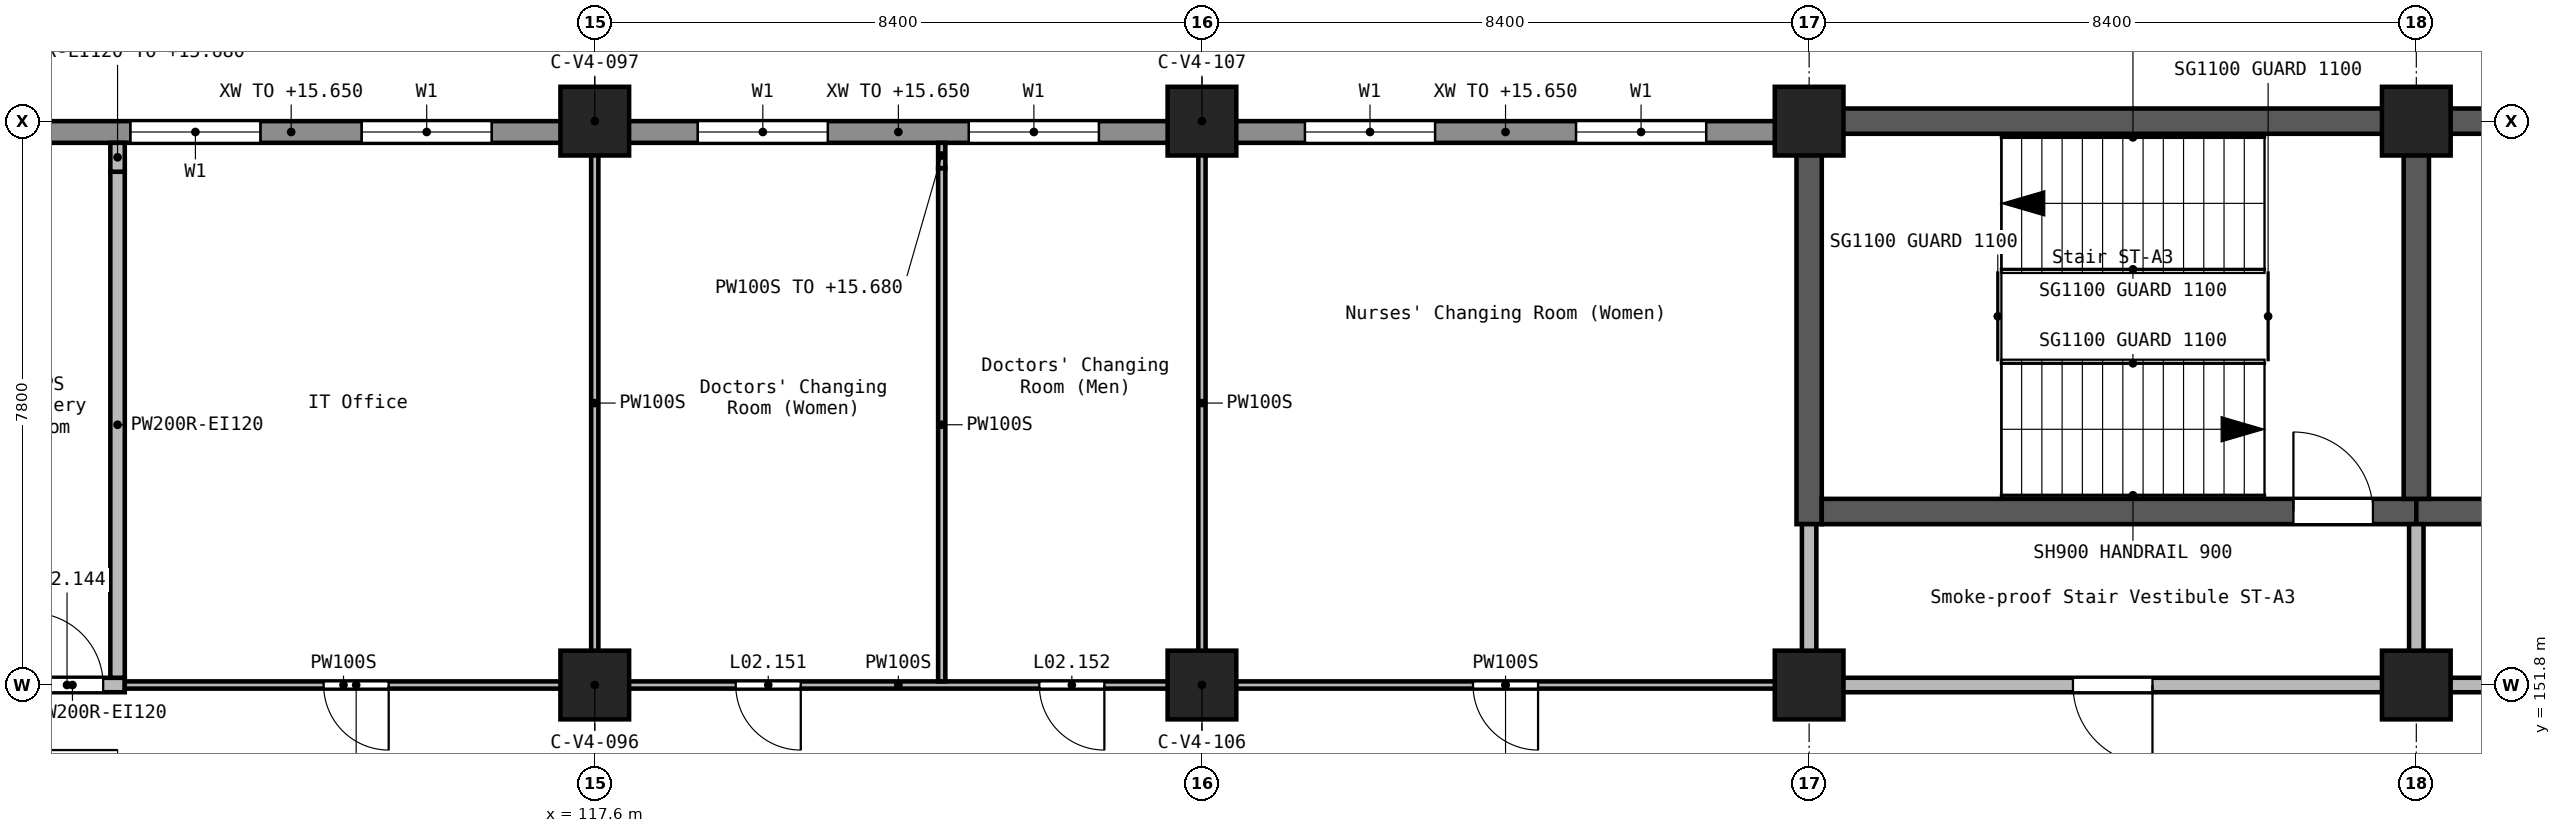
"""IFC4 building model, lengths in metres.
Left out: names, types, materials, properties, quantities, classifications, styles, units other than length and angle.
Written with IfcOpenShell. Run it as: python <this file> out.ifc"""

import sys

from ifc_helpers import new_model, si_unit, direction, frame, frame_2d, origin, origin_2d, place, context, subcontext, project, spatial, rectangle, extrude, element, fill, save


model = new_model("IFC4")
c1 = context("Model", 3, precision=1e-05, world=origin(), true_north=direction((0.0, 1.0)))
c2 = subcontext(c1, "Body", "Model", "MODEL_VIEW")
j1 = project(units=[si_unit("LENGTHUNIT", "METRE"), si_unit("PLANEANGLEUNIT", "RADIAN")], contexts=[c1])
p1 = place(None, origin())
s1 = spatial("IfcSite", under=j1, at=p1, CompositionType="ELEMENT")
p2 = place(p1, origin())
s2 = spatial("IfcBuilding", under=s1, at=p2, CompositionType="ELEMENT")
p3 = place(p2, frame((0.0, 0.0, 12.6)))
s3 = spatial("IfcBuildingStorey", under=s2, at=p3, CompositionType="ELEMENT", Elevation=12.6)
for number, where, z_axis, x_axis in (
    (1, (117.6, 151.8, 0.0), (0.0, 0.0, 1.0), (1.0, 0.0, 0.0)),
    (2, (117.6, 159.6, 0.0), (0.0, 0.0, 1.0), (1.0, 0.0, 0.0)),
    (3, (126.0, 151.8, 0.0), (0.0, 0.0, 1.0), (1.0, 0.0, 0.0)),
    (4, (126.0, 159.6, 0.0), (0.0, 0.0, 1.0), (1.0, 0.0, 0.0)),
    (5, (134.4, 151.8, 0.0), (0.0, 0.0, 1.0), (1.0, 0.0, 0.0)),
    (6, (134.4, 159.6, 0.0), (0.0, 0.0, 1.0), (1.0, 0.0, 0.0)),
    (7, (142.8, 151.8, 0.0), (0.0, 0.0, 1.0), (1.0, 0.0, 0.0)),
    (8, (142.8, 159.6, 0.0), (0.0, 0.0, 1.0), (1.0, 0.0, 0.0)),
):
    element("IfcColumn", number, at=place(p3, frame(where, z_axis=z_axis, x_axis=x_axis)), inside=s3, PredefinedType="COLUMN", context=c2, shape_type="SweptSolid", body=[
        extrude(rectangle(XDim=0.95, YDim=0.95, at=origin_2d()), origin(), (0.0, 0.0, 1.0), 4.2),
    ])
p4 = place(p3, frame((134.225, 159.6, 0.0), z_axis=(0.0, 0.0, 1.0), x_axis=(1.0, 0.0, 0.0)))
e9 = element("IfcWall", 9, at=p4, inside=s3, PredefinedType="SHEAR", context=c2, shape_type="SweptSolid", body=[
    extrude(rectangle(XDim=8.575, YDim=0.35, at=frame_2d((4.288, 0.0))), origin(), (0.0, 0.0, 1.0), 4.2),
])
p5 = place(p3, frame((134.4, 154.025, 0.0), z_axis=(0.0, 0.0, 1.0), x_axis=(0.0, 1.0, 0.0)))
e10 = element("IfcWall", 10, at=p5, inside=s3, PredefinedType="SHEAR", context=c2, shape_type="SweptSolid", body=[
    extrude(rectangle(XDim=5.4, YDim=0.35, at=frame_2d((2.7, 0.0))), origin(), (0.0, 0.0, 1.0), 4.2),
])
p6 = place(p3, frame((134.575, 154.2, 0.0), z_axis=(0.0, 0.0, 1.0), x_axis=(1.0, 0.0, 0.0)))
e11 = element("IfcWall", 11, at=p6, inside=s3, PredefinedType="SHEAR", context=c2, shape_type="SweptSolid", body=[
    extrude(rectangle(XDim=8.225, YDim=0.35, at=frame_2d((4.113, 0.0))), origin(), (0.0, 0.0, 1.0), 4.2),
])
p7 = place(p6, frame((6.525, 0.0, 0.0)))
e12 = element("IfcOpeningElement", 12, at=p7, cuts=e11, PredefinedType="OPENING", context=c2, shape_type="SweptSolid", body=[
    extrude(rectangle(XDim=1.1, YDim=2.1, at=frame_2d((0.55, 1.05))), frame((0.0, 0.185, 0.0), z_axis=(0.0, -1.0, 0.0), x_axis=(1.0, 0.0, 0.0)), (0.0, 0.0, 1.0), 0.37),
])
p8 = place(p3, frame((142.8, 154.2, 0.0), z_axis=(0.0, 0.0, 1.0), x_axis=(1.0, 0.0, 0.0)))
e13 = element("IfcWall", 13, at=p8, inside=s3, PredefinedType="SHEAR", context=c2, shape_type="SweptSolid", body=[
    extrude(rectangle(XDim=8.4, YDim=0.35, at=frame_2d((4.2, 0.0))), origin(), (0.0, 0.0, 1.0), 4.2),
])
p9 = place(p8, frame((6.7, 0.0, 0.0)))
e14 = element("IfcOpeningElement", 14, at=p9, cuts=e13, PredefinedType="OPENING", context=c2, shape_type="SweptSolid", body=[
    extrude(rectangle(XDim=1.1, YDim=2.1, at=frame_2d((0.55, 1.05))), frame((0.0, 0.185, 0.0), z_axis=(0.0, -1.0, 0.0), x_axis=(1.0, 0.0, 0.0)), (0.0, 0.0, 1.0), 0.37),
])
p10 = place(p3, frame((142.8, 154.375, 0.0), z_axis=(0.0, 0.0, 1.0), x_axis=(0.0, 1.0, 0.0)))
e15 = element("IfcWall", 15, at=p10, inside=s3, PredefinedType="SHEAR", context=c2, shape_type="SweptSolid", body=[
    extrude(rectangle(XDim=5.05, YDim=0.35, at=frame_2d((2.525, 0.0))), origin(), (0.0, 0.0, 1.0), 4.2),
])
p11 = place(p3, frame((142.8, 159.6, 0.0), z_axis=(0.0, 0.0, 1.0), x_axis=(1.0, 0.0, 0.0)))
e16 = element("IfcWall", 16, at=p11, inside=s3, PredefinedType="SHEAR", context=c2, shape_type="SweptSolid", body=[
    extrude(rectangle(XDim=8.4, YDim=0.35, at=frame_2d((4.2, 0.0))), origin(), (0.0, 0.0, 1.0), 4.2),
])
p12 = place(p3, frame((133.95, 159.45, 0.0), z_axis=(0.0, 0.0, 1.0), x_axis=(-1.0, 0.0, 0.0)))
e17 = element("IfcWall", 17, at=p12, inside=s3, PredefinedType="STANDARD", context=c2, shape_type="SweptSolid", body=[
    extrude(rectangle(XDim=7.5, YDim=0.3, at=frame_2d((3.75, 0.0))), origin(), (0.0, 0.0, 1.0), 3.05),
])
p13 = place(p12, frame((0.975, 0.0, 0.9)))
e18 = element("IfcOpeningElement", 18, at=p13, cuts=e17, PredefinedType="OPENING", context=c2, shape_type="SweptSolid", body=[
    extrude(rectangle(XDim=1.8, YDim=1.5, at=frame_2d((0.9, 0.75))), frame((0.0, 0.16, 0.0), z_axis=(0.0, -1.0, 0.0), x_axis=(1.0, 0.0, 0.0)), (0.0, 0.0, 1.0), 0.32),
])
p14 = place(p12, frame((4.725, 0.0, 0.9)))
e19 = element("IfcOpeningElement", 19, at=p14, cuts=e17, PredefinedType="OPENING", context=c2, shape_type="SweptSolid", body=[
    extrude(rectangle(XDim=1.8, YDim=1.5, at=frame_2d((0.9, 0.75))), frame((0.0, 0.16, 0.0), z_axis=(0.0, -1.0, 0.0), x_axis=(1.0, 0.0, 0.0)), (0.0, 0.0, 1.0), 0.32),
])
p15 = place(p3, frame((125.55, 159.45, 0.0), z_axis=(0.0, 0.0, 1.0), x_axis=(-1.0, 0.0, 0.0)))
e20 = element("IfcWall", 20, at=p15, inside=s3, PredefinedType="STANDARD", context=c2, shape_type="SweptSolid", body=[
    extrude(rectangle(XDim=7.5, YDim=0.3, at=frame_2d((3.75, 0.0))), origin(), (0.0, 0.0, 1.0), 3.05),
])
p16 = place(p15, frame((0.975, 0.0, 0.9)))
e21 = element("IfcOpeningElement", 21, at=p16, cuts=e20, PredefinedType="OPENING", context=c2, shape_type="SweptSolid", body=[
    extrude(rectangle(XDim=1.8, YDim=1.5, at=frame_2d((0.9, 0.75))), frame((0.0, 0.16, 0.0), z_axis=(0.0, -1.0, 0.0), x_axis=(1.0, 0.0, 0.0)), (0.0, 0.0, 1.0), 0.32),
])
p17 = place(p15, frame((4.725, 0.0, 0.9)))
e22 = element("IfcOpeningElement", 22, at=p17, cuts=e20, PredefinedType="OPENING", context=c2, shape_type="SweptSolid", body=[
    extrude(rectangle(XDim=1.8, YDim=1.5, at=frame_2d((0.9, 0.75))), frame((0.0, 0.16, 0.0), z_axis=(0.0, -1.0, 0.0), x_axis=(1.0, 0.0, 0.0)), (0.0, 0.0, 1.0), 0.32),
])
p18 = place(p3, frame((117.15, 159.45, 0.0), z_axis=(0.0, 0.0, 1.0), x_axis=(-1.0, 0.0, 0.0)))
e23 = element("IfcWall", 23, at=p18, inside=s3, PredefinedType="STANDARD", context=c2, shape_type="SweptSolid", body=[
    extrude(rectangle(XDim=7.5, YDim=0.3, at=frame_2d((3.75, 0.0))), origin(), (0.0, 0.0, 1.0), 3.05),
])
p19 = place(p18, frame((0.975, 0.0, 0.9)))
e24 = element("IfcOpeningElement", 24, at=p19, cuts=e23, PredefinedType="OPENING", context=c2, shape_type="SweptSolid", body=[
    extrude(rectangle(XDim=1.8, YDim=1.5, at=frame_2d((0.9, 0.75))), frame((0.0, 0.16, 0.0), z_axis=(0.0, -1.0, 0.0), x_axis=(1.0, 0.0, 0.0)), (0.0, 0.0, 1.0), 0.32),
])
p20 = place(p18, frame((4.175, 0.0, 0.9)))
e25 = element("IfcOpeningElement", 25, at=p20, cuts=e23, PredefinedType="OPENING", context=c2, shape_type="SweptSolid", body=[
    extrude(rectangle(XDim=1.8, YDim=1.5, at=frame_2d((0.9, 0.75))), frame((0.0, 0.16, 0.0), z_axis=(0.0, -1.0, 0.0), x_axis=(1.0, 0.0, 0.0)), (0.0, 0.0, 1.0), 0.32),
])
p21 = place(p3, frame((150.75, 151.8, 0.0), z_axis=(0.0, 0.0, 1.0), x_axis=(-1.0, 0.0, 0.0)))
e26 = element("IfcWall", 26, at=p21, inside=s3, PredefinedType="SOLIDWALL", context=c2, shape_type="SweptSolid", body=[
    extrude(rectangle(XDim=7.5, YDim=0.2, at=frame_2d((3.75, 0.0))), origin(), (0.0, 0.0, 1.0), 3.85),
])
p22 = place(p21, frame((3.2, 0.0, 0.0)))
e27 = element("IfcOpeningElement", 27, at=p22, cuts=e26, PredefinedType="OPENING", context=c2, shape_type="SweptSolid", body=[
    extrude(rectangle(XDim=1.1, YDim=2.1, at=frame_2d((0.55, 1.05))), frame((0.0, 0.11, 0.0), z_axis=(0.0, -1.0, 0.0), x_axis=(1.0, 0.0, 0.0)), (0.0, 0.0, 1.0), 0.22),
])
p23 = place(p3, frame((142.35, 151.8, 0.0), z_axis=(0.0, 0.0, 1.0), x_axis=(-1.0, 0.0, 0.0)))
e28 = element("IfcWall", 28, at=p23, inside=s3, PredefinedType="SOLIDWALL", context=c2, shape_type="SweptSolid", body=[
    extrude(rectangle(XDim=7.5, YDim=0.2, at=frame_2d((3.75, 0.0))), origin(), (0.0, 0.0, 1.0), 3.85),
])
p24 = place(p23, frame((3.2, 0.0, 0.0)))
e29 = element("IfcOpeningElement", 29, at=p24, cuts=e28, PredefinedType="OPENING", context=c2, shape_type="SweptSolid", body=[
    extrude(rectangle(XDim=1.1, YDim=2.1, at=frame_2d((0.55, 1.05))), frame((0.0, 0.11, 0.0), z_axis=(0.0, -1.0, 0.0), x_axis=(1.0, 0.0, 0.0)), (0.0, 0.0, 1.0), 0.22),
])
p25 = place(p3, frame((109.65, 151.8, 0.0), z_axis=(0.0, 0.0, 1.0), x_axis=(1.0, 0.0, 0.0)))
e30 = element("IfcWall", 30, at=p25, inside=s3, PredefinedType="SOLIDWALL", context=c2, shape_type="SweptSolid", body=[
    extrude(rectangle(XDim=1.448, YDim=0.2, at=frame_2d((0.724, 0.0))), origin(), (0.0, 0.0, 1.0), 3.85),
])
p26 = place(p25, frame((0.149, 0.0, 0.0)))
e31 = element("IfcOpeningElement", 31, at=p26, cuts=e30, PredefinedType="OPENING", context=c2, shape_type="SweptSolid", body=[
    extrude(rectangle(XDim=1.0, YDim=2.1, at=frame_2d((0.5, 1.05))), frame((0.0, 0.11, 0.0), z_axis=(0.0, -1.0, 0.0), x_axis=(1.0, 0.0, 0.0)), (0.0, 0.0, 1.0), 0.22),
])
p27 = place(p3, frame((110.998, 151.9, 0.0), z_axis=(0.0, 0.0, 1.0), x_axis=(0.0, 1.0, 0.0)))
e32 = element("IfcWall", 32, at=p27, inside=s3, PredefinedType="SOLIDWALL", context=c2, shape_type="SweptSolid", body=[
    extrude(rectangle(XDim=7.0, YDim=0.2, at=frame_2d((3.5, 0.0))), origin(), (0.0, 0.0, 1.0), 3.85),
])
p28 = place(p3, frame((110.998, 158.9, 0.0), z_axis=(0.0, 0.0, 1.0), x_axis=(0.0, 1.0, 0.0)))
e33 = element("IfcWall", 33, at=p28, inside=s3, PredefinedType="SOLIDWALL", context=c2, shape_type="SweptSolid", body=[
    extrude(rectangle(XDim=0.4, YDim=0.2, at=frame_2d((0.2, 0.0))), origin(), (0.0, 0.0, 1.0), 3.08),
])
for number, where, z_axis, x_axis in (
    (34, (134.4, 152.25, 0.0), (0.0, 0.0, 1.0), (0.0, 1.0, 0.0)),
    (35, (142.8, 152.25, 0.0), (0.0, 0.0, 1.0), (0.0, 1.0, 0.0)),
):
    element("IfcWall", number, at=place(p3, frame(where, z_axis=z_axis, x_axis=x_axis)), inside=s3, PredefinedType="SOLIDWALL", context=c2, shape_type="SweptSolid", body=[
        extrude(rectangle(XDim=1.775, YDim=0.2, at=frame_2d((0.887, 0.0))), origin(), (0.0, 0.0, 1.0), 3.85),
    ])
p29 = place(p3, frame((133.95, 151.8, 0.0), z_axis=(0.0, 0.0, 1.0), x_axis=(-1.0, 0.0, 0.0)))
e36 = element("IfcWall", 36, at=p29, inside=s3, PredefinedType="PARTITIONING", context=c2, shape_type="SweptSolid", body=[
    extrude(rectangle(XDim=7.5, YDim=0.1, at=frame_2d((3.75, 0.0))), origin(), (0.0, 0.0, 1.0), 3.85),
])
p30 = place(p29, frame((3.3, 0.0, 0.0)))
e37 = element("IfcOpeningElement", 37, at=p30, cuts=e36, PredefinedType="OPENING", context=c2, shape_type="SweptSolid", body=[
    extrude(rectangle(XDim=0.9, YDim=2.1, at=frame_2d((0.45, 1.05))), frame((0.0, 0.06, 0.0), z_axis=(0.0, -1.0, 0.0), x_axis=(1.0, 0.0, 0.0)), (0.0, 0.0, 1.0), 0.12),
])
p31 = place(p3, frame((125.55, 151.8, 0.0), z_axis=(0.0, 0.0, 1.0), x_axis=(-1.0, 0.0, 0.0)))
e38 = element("IfcWall", 38, at=p31, inside=s3, PredefinedType="PARTITIONING", context=c2, shape_type="SweptSolid", body=[
    extrude(rectangle(XDim=7.5, YDim=0.1, at=frame_2d((3.75, 0.0))), origin(), (0.0, 0.0, 1.0), 3.85),
])
p32 = place(p31, frame((5.1, 0.0, 0.0)))
e39 = element("IfcOpeningElement", 39, at=p32, cuts=e38, PredefinedType="OPENING", context=c2, shape_type="SweptSolid", body=[
    extrude(rectangle(XDim=0.9, YDim=2.1, at=frame_2d((0.45, 1.05))), frame((0.0, 0.06, 0.0), z_axis=(0.0, -1.0, 0.0), x_axis=(1.0, 0.0, 0.0)), (0.0, 0.0, 1.0), 0.12),
])
p33 = place(p31, frame((0.9, 0.0, 0.0)))
e40 = element("IfcOpeningElement", 40, at=p33, cuts=e38, PredefinedType="OPENING", context=c2, shape_type="SweptSolid", body=[
    extrude(rectangle(XDim=0.9, YDim=2.1, at=frame_2d((0.45, 1.05))), frame((0.0, 0.06, 0.0), z_axis=(0.0, -1.0, 0.0), x_axis=(1.0, 0.0, 0.0)), (0.0, 0.0, 1.0), 0.12),
])
p34 = place(p3, frame((117.15, 151.8, 0.0), z_axis=(0.0, 0.0, 1.0), x_axis=(-1.0, 0.0, 0.0)))
e41 = element("IfcWall", 41, at=p34, inside=s3, PredefinedType="PARTITIONING", context=c2, shape_type="SweptSolid", body=[
    extrude(rectangle(XDim=6.052, YDim=0.1, at=frame_2d((3.026, 0.0))), origin(), (0.0, 0.0, 1.0), 3.85),
])
p35 = place(p34, frame((2.401, 0.0, 0.0)))
e42 = element("IfcOpeningElement", 42, at=p35, cuts=e41, PredefinedType="OPENING", context=c2, shape_type="SweptSolid", body=[
    extrude(rectangle(XDim=0.9, YDim=2.1, at=frame_2d((0.45, 1.05))), frame((0.0, 0.06, 0.0), z_axis=(0.0, -1.0, 0.0), x_axis=(1.0, 0.0, 0.0)), (0.0, 0.0, 1.0), 0.12),
])
p36 = place(p3, frame((117.6, 152.25, 0.0), z_axis=(0.0, 0.0, 1.0), x_axis=(0.0, 1.0, 0.0)))
e43 = element("IfcWall", 43, at=p36, inside=s3, PredefinedType="PARTITIONING", context=c2, shape_type="SweptSolid", body=[
    extrude(rectangle(XDim=6.9, YDim=0.1, at=frame_2d((3.45, 0.0))), origin(), (0.0, 0.0, 1.0), 3.85),
])
p37 = place(p3, frame((122.4, 151.85, 0.0), z_axis=(0.0, 0.0, 1.0), x_axis=(0.0, 1.0, 0.0)))
e44 = element("IfcWall", 44, at=p37, inside=s3, PredefinedType="PARTITIONING", context=c2, shape_type="SweptSolid", body=[
    extrude(rectangle(XDim=7.1, YDim=0.1, at=frame_2d((3.55, 0.0))), origin(), (0.0, 0.0, 1.0), 3.85),
])
p38 = place(p3, frame((122.4, 158.95, 0.0), z_axis=(0.0, 0.0, 1.0), x_axis=(0.0, 1.0, 0.0)))
e45 = element("IfcWall", 45, at=p38, inside=s3, PredefinedType="PARTITIONING", context=c2, shape_type="SweptSolid", body=[
    extrude(rectangle(XDim=0.35, YDim=0.1, at=frame_2d((0.175, 0.0))), origin(), (0.0, 0.0, 1.0), 3.08),
])
p39 = place(p3, frame((126.0, 152.25, 0.0), z_axis=(0.0, 0.0, 1.0), x_axis=(0.0, 1.0, 0.0)))
e46 = element("IfcWall", 46, at=p39, inside=s3, PredefinedType="PARTITIONING", context=c2, shape_type="SweptSolid", body=[
    extrude(rectangle(XDim=6.9, YDim=0.1, at=frame_2d((3.45, 0.0))), origin(), (0.0, 0.0, 1.0), 3.85),
])
p40 = place(p13, origin())
e47 = element("IfcWindow", 47, at=p40, inside=s3, PartitioningType="SINGLE_PANEL", PredefinedType="WINDOW", context=c2, shape_type="SweptSolid", body=[
    extrude(rectangle(XDim=1.8, YDim=1.5, at=frame_2d((0.9, 0.75))), frame((0.0, 0.03, 0.0), z_axis=(0.0, -1.0, 0.0), x_axis=(1.0, 0.0, 0.0)), (0.0, 0.0, 1.0), 0.06),
])
fill(e18, e47)
p41 = place(p14, origin())
e48 = element("IfcWindow", 48, at=p41, inside=s3, PartitioningType="SINGLE_PANEL", PredefinedType="WINDOW", context=c2, shape_type="SweptSolid", body=[
    extrude(rectangle(XDim=1.8, YDim=1.5, at=frame_2d((0.9, 0.75))), frame((0.0, 0.03, 0.0), z_axis=(0.0, -1.0, 0.0), x_axis=(1.0, 0.0, 0.0)), (0.0, 0.0, 1.0), 0.06),
])
fill(e19, e48)
p42 = place(p16, origin())
e49 = element("IfcWindow", 49, at=p42, inside=s3, PartitioningType="SINGLE_PANEL", PredefinedType="WINDOW", context=c2, shape_type="SweptSolid", body=[
    extrude(rectangle(XDim=1.8, YDim=1.5, at=frame_2d((0.9, 0.75))), frame((0.0, 0.03, 0.0), z_axis=(0.0, -1.0, 0.0), x_axis=(1.0, 0.0, 0.0)), (0.0, 0.0, 1.0), 0.06),
])
fill(e21, e49)
p43 = place(p17, origin())
e50 = element("IfcWindow", 50, at=p43, inside=s3, PartitioningType="SINGLE_PANEL", PredefinedType="WINDOW", context=c2, shape_type="SweptSolid", body=[
    extrude(rectangle(XDim=1.8, YDim=1.5, at=frame_2d((0.9, 0.75))), frame((0.0, 0.03, 0.0), z_axis=(0.0, -1.0, 0.0), x_axis=(1.0, 0.0, 0.0)), (0.0, 0.0, 1.0), 0.06),
])
fill(e22, e50)
p44 = place(p19, origin())
e51 = element("IfcWindow", 51, at=p44, inside=s3, PartitioningType="SINGLE_PANEL", PredefinedType="WINDOW", context=c2, shape_type="SweptSolid", body=[
    extrude(rectangle(XDim=1.8, YDim=1.5, at=frame_2d((0.9, 0.75))), frame((0.0, 0.03, 0.0), z_axis=(0.0, -1.0, 0.0), x_axis=(1.0, 0.0, 0.0)), (0.0, 0.0, 1.0), 0.06),
])
fill(e24, e51)
p45 = place(p20, origin())
e52 = element("IfcWindow", 52, at=p45, inside=s3, PartitioningType="SINGLE_PANEL", PredefinedType="WINDOW", context=c2, shape_type="SweptSolid", body=[
    extrude(rectangle(XDim=1.8, YDim=1.5, at=frame_2d((0.9, 0.75))), frame((0.0, 0.03, 0.0), z_axis=(0.0, -1.0, 0.0), x_axis=(1.0, 0.0, 0.0)), (0.0, 0.0, 1.0), 0.06),
])
fill(e25, e52)
p46 = place(p7, origin())
e53 = element("IfcDoor", 53, at=p46, inside=s3, OperationType="SINGLE_SWING_RIGHT", PredefinedType="DOOR", context=c2, shape_type="SweptSolid", body=[
    extrude(rectangle(XDim=1.1, YDim=2.1, at=frame_2d((0.55, 1.05))), frame((0.0, 0.025, 0.0), z_axis=(0.0, -1.0, 0.0), x_axis=(1.0, 0.0, 0.0)), (0.0, 0.0, 1.0), 0.05),
])
fill(e12, e53)
p47 = place(p24, frame((1.1, 0.0, 0.0), z_axis=(0.0, 0.0, 1.0), x_axis=(-1.0, 0.0, 0.0)))
e54 = element("IfcDoor", 54, at=p47, inside=s3, OperationType="SINGLE_SWING_RIGHT", PredefinedType="DOOR", context=c2, shape_type="SweptSolid", body=[
    extrude(rectangle(XDim=1.1, YDim=2.1, at=frame_2d((0.55, 1.05))), frame((0.0, 0.025, 0.0), z_axis=(0.0, -1.0, 0.0), x_axis=(1.0, 0.0, 0.0)), (0.0, 0.0, 1.0), 0.05),
])
fill(e29, e54)
p48 = place(p26, origin())
e55 = element("IfcDoor", 55, at=p48, inside=s3, OperationType="SINGLE_SWING_LEFT", PredefinedType="DOOR", context=c2, shape_type="SweptSolid", body=[
    extrude(rectangle(XDim=1.0, YDim=2.1, at=frame_2d((0.5, 1.05))), frame((0.0, 0.025, 0.0), z_axis=(0.0, -1.0, 0.0), x_axis=(1.0, 0.0, 0.0)), (0.0, 0.0, 1.0), 0.05),
])
fill(e31, e55)
p49 = place(p35, frame((0.9, 0.0, 0.0), z_axis=(0.0, 0.0, 1.0), x_axis=(-1.0, 0.0, 0.0)))
e56 = element("IfcDoor", 56, at=p49, inside=s3, OperationType="SINGLE_SWING_RIGHT", PredefinedType="DOOR", context=c2, shape_type="SweptSolid", body=[
    extrude(rectangle(XDim=0.9, YDim=2.1, at=frame_2d((0.45, 1.05))), frame((0.0, 0.025, 0.0), z_axis=(0.0, -1.0, 0.0), x_axis=(1.0, 0.0, 0.0)), (0.0, 0.0, 1.0), 0.05),
])
fill(e42, e56)
p50 = place(p32, frame((0.9, 0.0, 0.0), z_axis=(0.0, 0.0, 1.0), x_axis=(-1.0, 0.0, 0.0)))
e57 = element("IfcDoor", 57, at=p50, inside=s3, OperationType="SINGLE_SWING_LEFT", PredefinedType="DOOR", context=c2, shape_type="SweptSolid", body=[
    extrude(rectangle(XDim=0.9, YDim=2.1, at=frame_2d((0.45, 1.05))), frame((0.0, 0.025, 0.0), z_axis=(0.0, -1.0, 0.0), x_axis=(1.0, 0.0, 0.0)), (0.0, 0.0, 1.0), 0.05),
])
fill(e39, e57)
p51 = place(p33, frame((0.9, 0.0, 0.0), z_axis=(0.0, 0.0, 1.0), x_axis=(-1.0, 0.0, 0.0)))
e58 = element("IfcDoor", 58, at=p51, inside=s3, OperationType="SINGLE_SWING_RIGHT", PredefinedType="DOOR", context=c2, shape_type="SweptSolid", body=[
    extrude(rectangle(XDim=0.9, YDim=2.1, at=frame_2d((0.45, 1.05))), frame((0.0, 0.025, 0.0), z_axis=(0.0, -1.0, 0.0), x_axis=(1.0, 0.0, 0.0)), (0.0, 0.0, 1.0), 0.05),
])
fill(e40, e58)
p52 = place(p30, frame((0.9, 0.0, 0.0), z_axis=(0.0, 0.0, 1.0), x_axis=(-1.0, 0.0, 0.0)))
e59 = element("IfcDoor", 59, at=p52, inside=s3, OperationType="SINGLE_SWING_LEFT", PredefinedType="DOOR", context=c2, shape_type="SweptSolid", body=[
    extrude(rectangle(XDim=0.9, YDim=2.1, at=frame_2d((0.45, 1.05))), frame((0.0, 0.025, 0.0), z_axis=(0.0, -1.0, 0.0), x_axis=(1.0, 0.0, 0.0)), (0.0, 0.0, 1.0), 0.05),
])
fill(e37, e59)
save(model, sys.argv[1])
